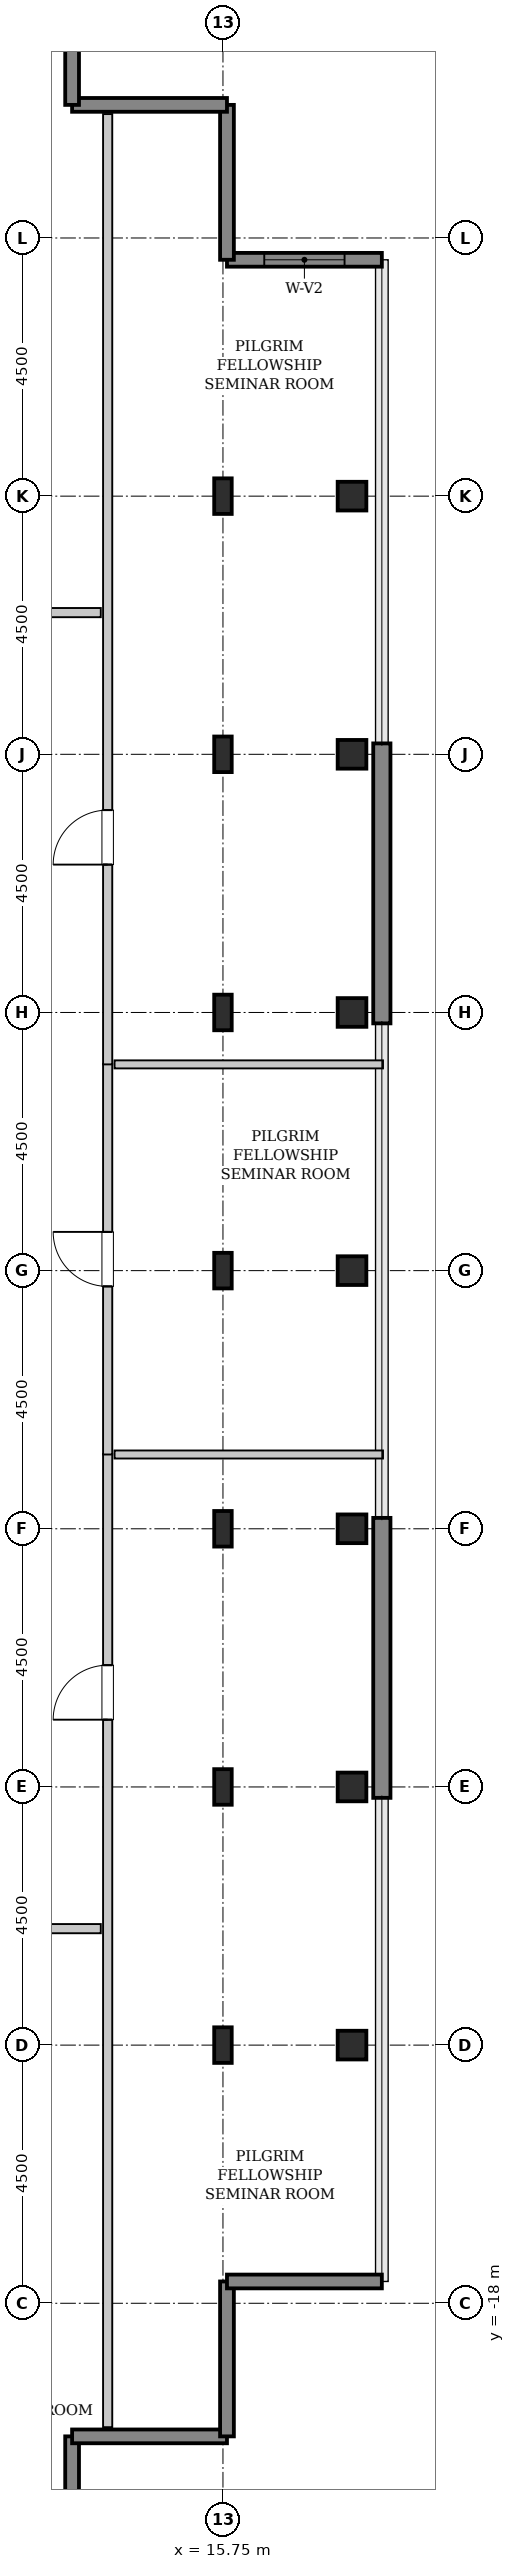
"""IFC4 building model, lengths in metres.
Left out: names, types, materials, properties, quantities, classifications, styles, units other than length and angle.
Written with IfcOpenShell. Run it as: python <this file> out.ifc"""

import sys

from ifc_helpers import new_model, si_unit, direction, frame, frame_2d, origin, origin_2d, place, context, subcontext, project, spatial, rectangle, hollow_rectangle, i_section, extrude, source, transform, mapped, element, fill, save


model = new_model("IFC4")
c1 = context("Model", 3, precision=1e-05, world=origin(), true_north=direction((0.0, 1.0)))
c2 = subcontext(c1, "Body", "Model", "MODEL_VIEW")
j1 = project(units=[si_unit("LENGTHUNIT", "METRE"), si_unit("PLANEANGLEUNIT", "RADIAN")], contexts=[c1])
p1 = place(None, origin())
s1 = spatial("IfcSite", under=j1, at=p1, CompositionType="ELEMENT")
p2 = place(p1, origin())
s2 = spatial("IfcBuilding", under=s1, at=p2, CompositionType="ELEMENT")
p3 = place(p2, frame((0.0, 0.0, 333.8)))
s3 = spatial("IfcBuildingStorey", under=s2, at=p3, CompositionType="ELEMENT", Elevation=333.8)
m1 = source(origin(), c2, "Body", "SweptSolid", [
    extrude(i_section(OverallWidth=0.305, OverallDepth=0.62, WebThickness=0.021, FlangeThickness=0.04, FilletRadius=0.027, at=origin_2d()), origin(), (0.0, 0.0, 1.0), 3.8),
])
for number, where, z_axis, x_axis in (
    (1, (15.75, -13.5, 0.0), (0.0, 0.0, 1.0), (1.0, 0.0, 0.0)),
    (2, (15.75, -9.0, 0.0), (0.0, 0.0, 1.0), (1.0, 0.0, 0.0)),
    (3, (15.75, -4.5, 0.0), (0.0, 0.0, 1.0), (1.0, 0.0, 0.0)),
    (4, (15.75, 0.0, 0.0), (0.0, 0.0, 1.0), (1.0, 0.0, 0.0)),
    (5, (15.75, 4.5, 0.0), (0.0, 0.0, 1.0), (1.0, 0.0, 0.0)),
    (6, (15.75, 9.0, 0.0), (0.0, 0.0, 1.0), (1.0, 0.0, 0.0)),
    (7, (15.75, 13.5, 0.0), (0.0, 0.0, 1.0), (1.0, 0.0, 0.0)),
):
    element("IfcColumn", number, at=place(p3, frame(where, z_axis=z_axis, x_axis=x_axis)), inside=s3, PredefinedType="COLUMN", context=c2, shape_type="MappedRepresentation", body=[
        mapped(m1, transform((0.0, 0.0, 0.0), x_axis=(1.0, 0.0, 0.0), y_axis=(0.0, 1.0, 0.0), z_axis=(0.0, 0.0, 1.0), scale=1.0)),
    ])
m2 = source(origin(), c2, "Body", "SweptSolid", [
    extrude(hollow_rectangle(XDim=0.5, YDim=0.5, WallThickness=0.025, InnerFilletRadius=0.025, OuterFilletRadius=0.05, at=origin_2d()), origin(), (0.0, 0.0, 1.0), 3.8),
])
for number, where, z_axis, x_axis in (
    (8, (18.0, -13.5, 0.0), (0.0, 0.0, 1.0), (1.0, 0.0, 0.0)),
    (9, (18.0, -9.0, 0.0), (0.0, 0.0, 1.0), (1.0, 0.0, 0.0)),
    (10, (18.0, -4.5, 0.0), (0.0, 0.0, 1.0), (1.0, 0.0, 0.0)),
    (11, (18.0, 0.0, 0.0), (0.0, 0.0, 1.0), (1.0, 0.0, 0.0)),
    (12, (18.0, 4.5, 0.0), (0.0, 0.0, 1.0), (1.0, 0.0, 0.0)),
    (13, (18.0, 9.0, 0.0), (0.0, 0.0, 1.0), (1.0, 0.0, 0.0)),
    (14, (18.0, 13.5, 0.0), (0.0, 0.0, 1.0), (1.0, 0.0, 0.0)),
):
    element("IfcColumn", number, at=place(p3, frame(where, z_axis=z_axis, x_axis=x_axis)), inside=s3, PredefinedType="COLUMN", context=c2, shape_type="MappedRepresentation", body=[
        mapped(m2, transform((0.0, 0.0, 0.0), x_axis=(1.0, 0.0, 0.0), y_axis=(0.0, 1.0, 0.0), z_axis=(0.0, 0.0, 1.0), scale=1.0)),
    ])
m3 = source(origin(), c2, "Body", "SweptSolid", [
    extrude(rectangle(XDim=4.88, YDim=0.3, at=frame_2d((2.44, 0.0))), origin(), (0.0, 0.0, 1.0), 3.55),
])
for number, where, z_axis, x_axis in (
    (15, (18.52, -9.19, 0.0), (0.0, 0.0, 1.0), (0.0, 1.0, 0.0)),
    (16, (18.52, 4.31, 0.0), (0.0, 0.0, 1.0), (0.0, 1.0, 0.0)),
):
    element("IfcWall", number, at=place(p3, frame(where, z_axis=z_axis, x_axis=x_axis)), inside=s3, PredefinedType="SHEAR", context=c2, shape_type="MappedRepresentation", body=[
        mapped(m3, transform((0.0, 0.0, 0.0), x_axis=(1.0, 0.0, 0.0), y_axis=(0.0, 1.0, 0.0), z_axis=(0.0, 0.0, 1.0), scale=1.0)),
    ])
m4 = source(origin(), c2, "Body", "SweptSolid", [
    extrude(rectangle(XDim=2.7, YDim=0.24, at=frame_2d((1.35, 0.0))), origin(), (0.0, 0.0, 1.0), 3.55),
])
p4 = place(p3, frame((18.52, 17.62, 0.0), z_axis=(0.0, 0.0, 1.0), x_axis=(-1.0, 0.0, 0.0)))
e17 = element("IfcWall", 17, at=p4, inside=s3, PredefinedType="SHEAR", context=c2, shape_type="MappedRepresentation", body=[
    mapped(m4, transform((0.0, 0.0, 0.0), x_axis=(1.0, 0.0, 0.0), y_axis=(0.0, 1.0, 0.0), z_axis=(0.0, 0.0, 1.0), scale=1.0)),
])
p5 = place(p4, frame((0.65, 0.0, 0.85)))
e18 = element("IfcOpeningElement", 18, at=p5, cuts=e17, PredefinedType="OPENING", context=c2, shape_type="SweptSolid", body=[
    extrude(rectangle(XDim=1.4, YDim=1.8, at=frame_2d((0.7, 0.9))), frame((0.0, 0.13, 0.0), z_axis=(0.0, -1.0, 0.0), x_axis=(1.0, 0.0, 0.0)), (0.0, 0.0, 1.0), 0.26),
])
for number, where, z_axis, x_axis in (
    (19, (15.82, 17.62, 0.0), (0.0, 0.0, 1.0), (0.0, 1.0, 0.0)),
    (20, (15.82, 20.32, 0.0), (0.0, 0.0, 1.0), (-1.0, 0.0, 0.0)),
    (21, (13.12, 20.32, 0.0), (0.0, 0.0, 1.0), (0.0, 1.0, 0.0)),
    (22, (13.12, -23.02, 0.0), (0.0, 0.0, 1.0), (0.0, 1.0, 0.0)),
    (23, (13.12, -20.32, 0.0), (0.0, 0.0, 1.0), (1.0, 0.0, 0.0)),
    (24, (15.82, -20.32, 0.0), (0.0, 0.0, 1.0), (0.0, 1.0, 0.0)),
    (25, (15.82, -17.62, 0.0), (0.0, 0.0, 1.0), (1.0, 0.0, 0.0)),
):
    element("IfcWall", number, at=place(p3, frame(where, z_axis=z_axis, x_axis=x_axis)), inside=s3, PredefinedType="SHEAR", context=c2, shape_type="MappedRepresentation", body=[
        mapped(m4, transform((0.0, 0.0, 0.0), x_axis=(1.0, 0.0, 0.0), y_axis=(0.0, 1.0, 0.0), z_axis=(0.0, 0.0, 1.0), scale=1.0)),
    ])
m5 = source(origin(), c2, "Body", "SweptSolid", [
    extrude(rectangle(XDim=16.965, YDim=0.16, at=frame_2d((8.482, 0.0))), origin(), (0.0, 0.0, 1.0), 3.535),
])
p6 = place(p3, frame((13.74, -20.16, 0.0), z_axis=(0.0, 0.0, 1.0), x_axis=(0.0, 1.0, 0.0)))
e26 = element("IfcWall", 26, at=p6, inside=s3, PredefinedType="PARTITIONING", context=c2, shape_type="MappedRepresentation", body=[
    mapped(m5, transform((0.0, 0.0, 0.0), x_axis=(1.0, 0.0, 0.0), y_axis=(0.0, 1.0, 0.0), z_axis=(0.0, 0.0, 1.0), scale=1.0)),
])
p7 = place(p6, frame((12.333, 0.0, 0.0)))
e27 = element("IfcOpeningElement", 27, at=p7, cuts=e26, PredefinedType="OPENING", context=c2, shape_type="SweptSolid", body=[
    extrude(rectangle(XDim=0.95, YDim=2.1, at=frame_2d((0.475, 1.05))), frame((0.0, 0.09, 0.0), z_axis=(0.0, -1.0, 0.0), x_axis=(1.0, 0.0, 0.0)), (0.0, 0.0, 1.0), 0.18),
])
m6 = source(origin(), c2, "Body", "SweptSolid", [
    extrude(rectangle(XDim=4.68, YDim=0.14, at=frame_2d((2.34, 0.0))), origin(), (0.0, 0.0, 1.0), 3.535),
])
p8 = place(p3, frame((13.86, -3.205, 0.0), z_axis=(0.0, 0.0, 1.0), x_axis=(1.0, 0.0, 0.0)))
e28 = element("IfcWall", 28, at=p8, inside=s3, PredefinedType="PARTITIONING", context=c2, shape_type="MappedRepresentation", body=[
    mapped(m6, transform((0.0, 0.0, 0.0), x_axis=(1.0, 0.0, 0.0), y_axis=(0.0, 1.0, 0.0), z_axis=(0.0, 0.0, 1.0), scale=1.0)),
])
m7 = source(origin(), c2, "Body", "SweptSolid", [
    extrude(rectangle(XDim=6.81, YDim=0.16, at=frame_2d((3.405, 0.0))), origin(), (0.0, 0.0, 1.0), 3.535),
])
p9 = place(p3, frame((13.74, -3.205, 0.0), z_axis=(0.0, 0.0, 1.0), x_axis=(0.0, 1.0, 0.0)))
e29 = element("IfcWall", 29, at=p9, inside=s3, PredefinedType="PARTITIONING", context=c2, shape_type="MappedRepresentation", body=[
    mapped(m7, transform((0.0, 0.0, 0.0), x_axis=(1.0, 0.0, 0.0), y_axis=(0.0, 1.0, 0.0), z_axis=(0.0, 0.0, 1.0), scale=1.0)),
])
p10 = place(p9, frame((2.93, 0.0, 0.0)))
e30 = element("IfcOpeningElement", 30, at=p10, cuts=e29, PredefinedType="OPENING", context=c2, shape_type="SweptSolid", body=[
    extrude(rectangle(XDim=0.95, YDim=2.1, at=frame_2d((0.475, 1.05))), frame((0.0, 0.09, 0.0), z_axis=(0.0, -1.0, 0.0), x_axis=(1.0, 0.0, 0.0)), (0.0, 0.0, 1.0), 0.18),
])
p11 = place(p3, frame((13.86, 3.595, 0.0), z_axis=(0.0, 0.0, 1.0), x_axis=(1.0, 0.0, 0.0)))
e31 = element("IfcWall", 31, at=p11, inside=s3, PredefinedType="PARTITIONING", context=c2, shape_type="MappedRepresentation", body=[
    mapped(m6, transform((0.0, 0.0, 0.0), x_axis=(1.0, 0.0, 0.0), y_axis=(0.0, 1.0, 0.0), z_axis=(0.0, 0.0, 1.0), scale=1.0)),
])
m8 = source(origin(), c2, "Body", "SweptSolid", [
    extrude(rectangle(XDim=16.565, YDim=0.16, at=frame_2d((8.282, 0.0))), origin(), (0.0, 0.0, 1.0), 3.535),
])
p12 = place(p3, frame((13.74, 3.595, 0.0), z_axis=(0.0, 0.0, 1.0), x_axis=(0.0, 1.0, 0.0)))
e32 = element("IfcWall", 32, at=p12, inside=s3, PredefinedType="PARTITIONING", context=c2, shape_type="MappedRepresentation", body=[
    mapped(m8, transform((0.0, 0.0, 0.0), x_axis=(1.0, 0.0, 0.0), y_axis=(0.0, 1.0, 0.0), z_axis=(0.0, 0.0, 1.0), scale=1.0)),
])
p13 = place(p12, frame((3.482, 0.0, 0.0)))
e33 = element("IfcOpeningElement", 33, at=p13, cuts=e32, PredefinedType="OPENING", context=c2, shape_type="SweptSolid", body=[
    extrude(rectangle(XDim=0.95, YDim=2.1, at=frame_2d((0.475, 1.05))), frame((0.0, 0.09, 0.0), z_axis=(0.0, -1.0, 0.0), x_axis=(1.0, 0.0, 0.0)), (0.0, 0.0, 1.0), 0.18),
])
m9 = source(origin(), c2, "Body", "SweptSolid", [
    extrude(rectangle(XDim=7.66, YDim=0.16, at=frame_2d((3.83, 0.0))), origin(), (0.0, 0.0, 1.0), 3.535),
])
p14 = place(p3, frame((5.96, 11.47, 0.0), z_axis=(0.0, 0.0, 1.0), x_axis=(1.0, 0.0, 0.0)))
e34 = element("IfcWall", 34, at=p14, inside=s3, PredefinedType="PARTITIONING", context=c2, shape_type="MappedRepresentation", body=[
    mapped(m9, transform((0.0, 0.0, 0.0), x_axis=(1.0, 0.0, 0.0), y_axis=(0.0, 1.0, 0.0), z_axis=(0.0, 0.0, 1.0), scale=1.0)),
])
p15 = place(p14, frame((3.355, 0.0, 0.0)))
e35 = element("IfcOpeningElement", 35, at=p15, cuts=e34, PredefinedType="OPENING", context=c2, shape_type="SweptSolid", body=[
    extrude(rectangle(XDim=0.95, YDim=2.1, at=frame_2d((0.475, 1.05))), frame((0.0, 0.09, 0.0), z_axis=(0.0, -1.0, 0.0), x_axis=(1.0, 0.0, 0.0)), (0.0, 0.0, 1.0), 0.18),
])
m10 = source(origin(), c2, "Body", "SweptSolid", [
    extrude(rectangle(XDim=4.66, YDim=0.16, at=frame_2d((2.33, 0.0))), origin(), (0.0, 0.0, 1.0), 3.535),
])
p16 = place(p3, frame((8.96, -11.47, 0.0), z_axis=(0.0, 0.0, 1.0), x_axis=(1.0, 0.0, 0.0)))
e36 = element("IfcWall", 36, at=p16, inside=s3, PredefinedType="PARTITIONING", context=c2, shape_type="MappedRepresentation", body=[
    mapped(m10, transform((0.0, 0.0, 0.0), x_axis=(1.0, 0.0, 0.0), y_axis=(0.0, 1.0, 0.0), z_axis=(0.0, 0.0, 1.0), scale=1.0)),
])
p17 = place(p16, frame((1.855, 0.0, 0.0)))
e37 = element("IfcOpeningElement", 37, at=p17, cuts=e36, PredefinedType="OPENING", context=c2, shape_type="SweptSolid", body=[
    extrude(rectangle(XDim=0.95, YDim=2.1, at=frame_2d((0.475, 1.05))), frame((0.0, 0.09, 0.0), z_axis=(0.0, -1.0, 0.0), x_axis=(1.0, 0.0, 0.0)), (0.0, 0.0, 1.0), 0.18),
])
m11 = source(origin(), c2, "Body", "SweptSolid", [
    extrude(rectangle(XDim=1.4, YDim=1.8, at=frame_2d((0.7, 0.9))), frame((0.0, 0.03, 0.0), z_axis=(0.0, -1.0, 0.0), x_axis=(1.0, 0.0, 0.0)), (0.0, 0.0, 1.0), 0.06),
])
p18 = place(p5, origin())
e38 = element("IfcWindow", 38, at=p18, inside=s3, PartitioningType="SINGLE_PANEL", PredefinedType="WINDOW", context=c2, shape_type="MappedRepresentation", body=[
    mapped(m11, transform((0.0, 0.0, 0.0), x_axis=(1.0, 0.0, 0.0), y_axis=(0.0, 1.0, 0.0), z_axis=(0.0, 0.0, 1.0), scale=1.0)),
])
fill(e18, e38)
m12 = source(origin(), c2, "Body", "SweptSolid", [
    extrude(rectangle(XDim=0.95, YDim=2.1, at=frame_2d((0.475, 1.05))), frame((0.0, 0.025, 0.0), z_axis=(0.0, -1.0, 0.0), x_axis=(1.0, 0.0, 0.0)), (0.0, 0.0, 1.0), 0.05),
])
p19 = place(p7, origin())
e39 = element("IfcDoor", 39, at=p19, inside=s3, OperationType="SINGLE_SWING_LEFT", PredefinedType="DOOR", context=c2, shape_type="MappedRepresentation", body=[
    mapped(m12, transform((0.0, 0.0, 0.0), x_axis=(1.0, 0.0, 0.0), y_axis=(0.0, 1.0, 0.0), z_axis=(0.0, 0.0, 1.0), scale=1.0)),
])
fill(e27, e39)
p20 = place(p10, origin())
e40 = element("IfcDoor", 40, at=p20, inside=s3, OperationType="SINGLE_SWING_RIGHT", PredefinedType="DOOR", context=c2, shape_type="MappedRepresentation", body=[
    mapped(m12, transform((0.0, 0.0, 0.0), x_axis=(1.0, 0.0, 0.0), y_axis=(0.0, 1.0, 0.0), z_axis=(0.0, 0.0, 1.0), scale=1.0)),
])
fill(e30, e40)
p21 = place(p13, origin())
e41 = element("IfcDoor", 41, at=p21, inside=s3, OperationType="SINGLE_SWING_LEFT", PredefinedType="DOOR", context=c2, shape_type="MappedRepresentation", body=[
    mapped(m12, transform((0.0, 0.0, 0.0), x_axis=(1.0, 0.0, 0.0), y_axis=(0.0, 1.0, 0.0), z_axis=(0.0, 0.0, 1.0), scale=1.0)),
])
fill(e33, e41)
save(model, sys.argv[1])
